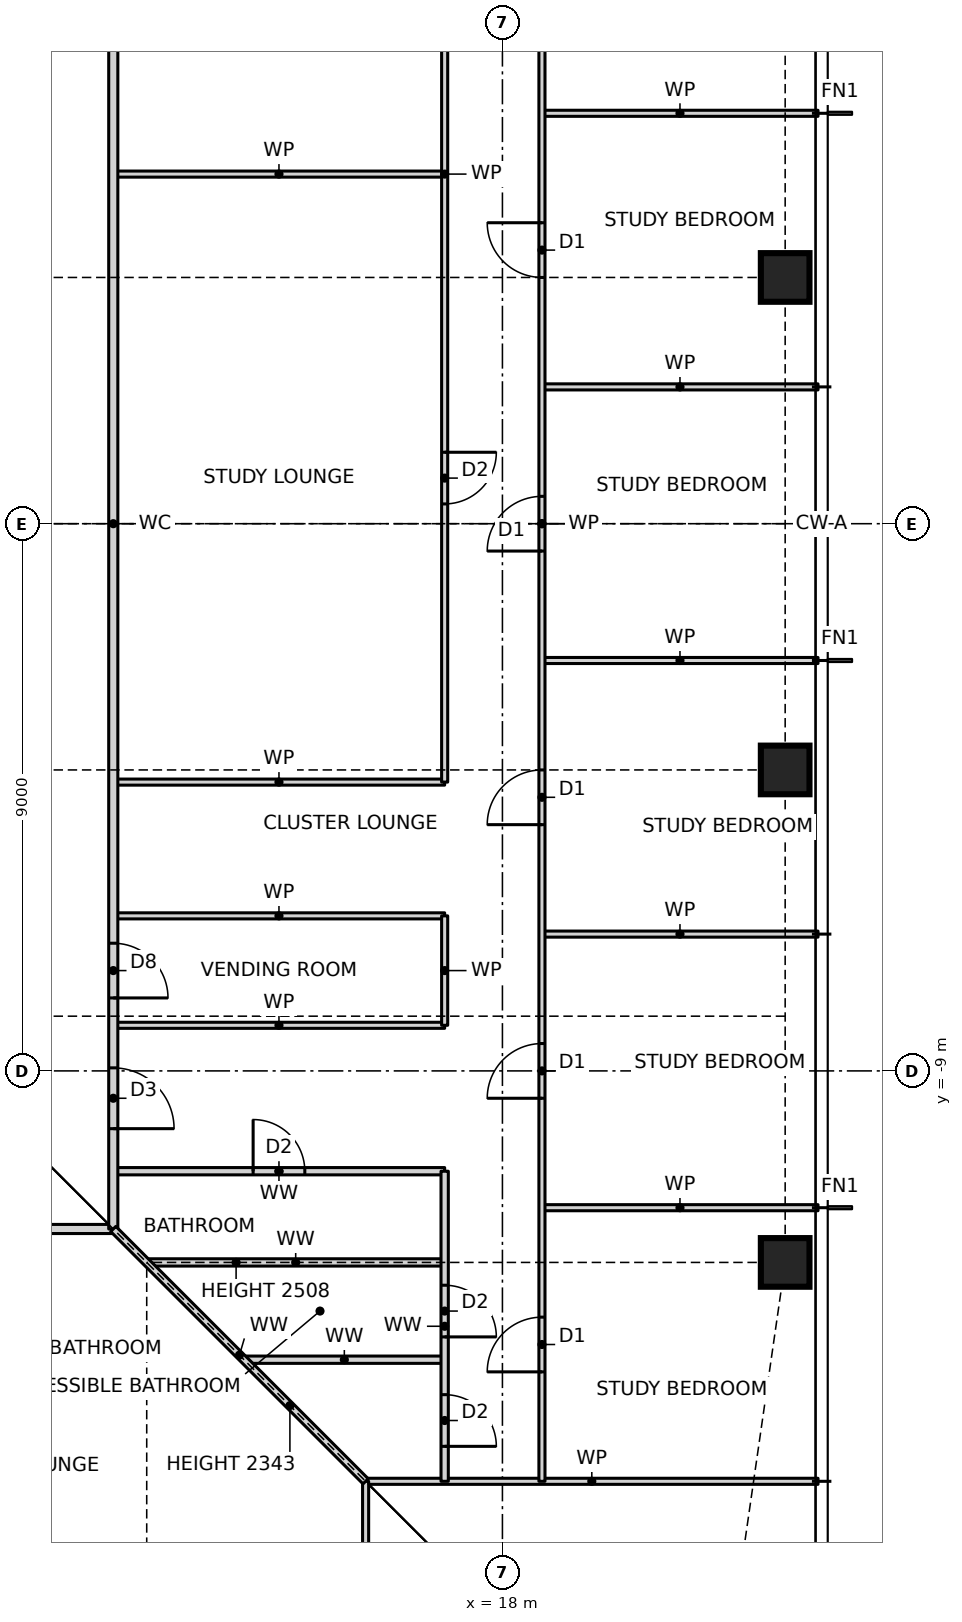
"""IFC4 building model, lengths in metres.
Left out: names, types, materials, properties, quantities, classifications, styles, units other than length and angle.
Written with IfcOpenShell. Run it as: python <this file> out.ifc"""

import sys

from ifc_helpers import new_model, si_unit, direction, frame, frame_2d, origin, origin_2d, place, context, subcontext, project, spatial, rectangle, hollow_rectangle, extrude, element, fill, save


model = new_model("IFC4")
c1 = context("Model", 3, precision=1e-05, world=origin(), true_north=direction((0.0, 1.0)))
c2 = subcontext(c1, "Body", "Model", "MODEL_VIEW")
j1 = project(units=[si_unit("LENGTHUNIT", "METRE"), si_unit("PLANEANGLEUNIT", "RADIAN")], contexts=[c1])
p1 = place(None, origin())
s1 = spatial("IfcSite", under=j1, at=p1, CompositionType="ELEMENT")
p2 = place(p1, origin())
s2 = spatial("IfcBuilding", under=s1, at=p2, CompositionType="ELEMENT")
p3 = place(p2, frame((0.0, 0.0, 50.0)))
s3 = spatial("IfcBuildingStorey", under=s2, at=p3, CompositionType="ELEMENT", Elevation=50.0)
for number, where, z_axis, x_axis in (
    (1, (22.65, -12.15, 0.0), (0.0, 0.0, 1.0), (1.0, 0.0, 0.0)),
    (2, (22.65, -4.05, 0.0), (0.0, 0.0, 1.0), (1.0, 0.0, 0.0)),
    (3, (22.65, 4.05, 0.0), (0.0, 0.0, 1.0), (1.0, 0.0, 0.0)),
):
    element("IfcColumn", number, at=place(p3, frame(where, z_axis=z_axis, x_axis=x_axis)), inside=s3, PredefinedType="COLUMN", context=c2, shape_type="SweptSolid", body=[
        extrude(hollow_rectangle(XDim=0.8, YDim=0.8, WallThickness=0.09, at=origin_2d()), origin(), (0.0, 0.0, 1.0), 3.5),
    ])
p4 = place(p3, frame((15.75, -15.75, 0.0), z_axis=(0.0, 0.0, 1.0), x_axis=(1.0, 0.0, 0.0)))
e4 = element("IfcWall", 4, at=p4, inside=s3, PredefinedType="PARTITIONING", context=c2, shape_type="SweptSolid", body=[
    extrude(rectangle(XDim=7.44, YDim=0.1, at=frame_2d((3.72, 0.0))), origin(), (0.0, 0.0, 1.0), 3.27),
])
p5 = place(p3, frame((13.75, -13.75, 0.0), z_axis=(0.0, 0.0, 1.0), x_axis=(1.0, 0.0, 0.0)))
e5 = element("IfcWall", 5, at=p5, inside=s3, PredefinedType="PARTITIONING", context=c2, shape_type="SweptSolid", body=[
    extrude(rectangle(XDim=3.3, YDim=0.12, at=frame_2d((1.65, 0.0))), origin(), (0.0, 0.0, 1.0), 3.27),
])
p6 = place(p3, frame((12.15, -12.15, 0.0), z_axis=(0.0, 0.0, 1.0), x_axis=(1.0, 0.0, 0.0)))
e6 = element("IfcWall", 6, at=p6, inside=s3, PredefinedType="PARTITIONING", context=c2, shape_type="SweptSolid", body=[
    extrude(rectangle(XDim=4.9, YDim=0.12, at=frame_2d((2.45, 0.0))), origin(), (0.0, 0.0, 1.0), 2.508),
])
p7 = place(p3, frame((-12.6, -11.6, 0.0), z_axis=(0.0, 0.0, 1.0), x_axis=(1.0, 0.0, 0.0)))
e7 = element("IfcWall", 7, at=p7, inside=s3, PredefinedType="PARTITIONING", context=c2, shape_type="SweptSolid", body=[
    extrude(rectangle(XDim=24.2, YDim=0.15, at=frame_2d((12.1, 0.0))), origin(), (0.0, 0.0, 1.0), 3.27),
])
p8 = place(p7, frame((1.74, 0.0, 0.0)))
e8 = element("IfcOpeningElement", 8, at=p8, cuts=e7, PredefinedType="OPENING", context=c2, shape_type="SweptSolid", body=[
    extrude(rectangle(XDim=1.0, YDim=2.1, at=frame_2d((0.5, 1.05))), frame((0.0, 0.085, 0.0), z_axis=(0.0, -1.0, 0.0), x_axis=(1.0, 0.0, 0.0)), (0.0, 0.0, 1.0), 0.17),
])
p9 = place(p7, frame((22.025, 0.0, 0.0)))
e9 = element("IfcOpeningElement", 9, at=p9, cuts=e7, PredefinedType="OPENING", context=c2, shape_type="SweptSolid", body=[
    extrude(rectangle(XDim=1.0, YDim=2.1, at=frame_2d((0.5, 1.05))), frame((0.0, 0.085, 0.0), z_axis=(0.0, -1.0, 0.0), x_axis=(1.0, 0.0, 0.0)), (0.0, 0.0, 1.0), 0.17),
])
p10 = place(p3, frame((18.65, -11.25, 0.0), z_axis=(0.0, 0.0, 1.0), x_axis=(1.0, 0.0, 0.0)))
e10 = element("IfcWall", 10, at=p10, inside=s3, PredefinedType="PARTITIONING", context=c2, shape_type="SweptSolid", body=[
    extrude(rectangle(XDim=4.54, YDim=0.1, at=frame_2d((2.27, 0.0))), origin(), (0.0, 0.0, 1.0), 3.27),
])
p11 = place(p3, frame((11.6, -10.65, 0.0), z_axis=(0.0, 0.0, 1.0), x_axis=(1.0, 0.0, 0.0)))
e11 = element("IfcWall", 11, at=p11, inside=s3, PredefinedType="PARTITIONING", context=c2, shape_type="SweptSolid", body=[
    extrude(rectangle(XDim=5.45, YDim=0.12, at=frame_2d((2.725, 0.0))), origin(), (0.0, 0.0, 1.0), 3.27),
])
p12 = place(p11, frame((2.3, 0.0, 0.0)))
e12 = element("IfcOpeningElement", 12, at=p12, cuts=e11, PredefinedType="OPENING", context=c2, shape_type="SweptSolid", body=[
    extrude(rectangle(XDim=0.85, YDim=2.1, at=frame_2d((0.425, 1.05))), frame((0.0, 0.07, 0.0), z_axis=(0.0, -1.0, 0.0), x_axis=(1.0, 0.0, 0.0)), (0.0, 0.0, 1.0), 0.14),
])
p13 = place(p3, frame((11.6, -8.25, 0.0), z_axis=(0.0, 0.0, 1.0), x_axis=(1.0, 0.0, 0.0)))
e13 = element("IfcWall", 13, at=p13, inside=s3, PredefinedType="PARTITIONING", context=c2, shape_type="SweptSolid", body=[
    extrude(rectangle(XDim=5.45, YDim=0.1, at=frame_2d((2.725, 0.0))), origin(), (0.0, 0.0, 1.0), 3.27),
])
p14 = place(p3, frame((18.65, -6.75, 0.0), z_axis=(0.0, 0.0, 1.0), x_axis=(1.0, 0.0, 0.0)))
e14 = element("IfcWall", 14, at=p14, inside=s3, PredefinedType="PARTITIONING", context=c2, shape_type="SweptSolid", body=[
    extrude(rectangle(XDim=4.54, YDim=0.1, at=frame_2d((2.27, 0.0))), origin(), (0.0, 0.0, 1.0), 3.27),
])
for number, where, z_axis, x_axis in (
    (15, (11.6, -6.45, 0.0), (0.0, 0.0, 1.0), (1.0, 0.0, 0.0)),
    (16, (11.6, -4.25, 0.0), (0.0, 0.0, 1.0), (1.0, 0.0, 0.0)),
):
    element("IfcWall", number, at=place(p3, frame(where, z_axis=z_axis, x_axis=x_axis)), inside=s3, PredefinedType="PARTITIONING", context=c2, shape_type="SweptSolid", body=[
        extrude(rectangle(XDim=5.45, YDim=0.1, at=frame_2d((2.725, 0.0))), origin(), (0.0, 0.0, 1.0), 3.27),
    ])
for number, where, z_axis, x_axis in (
    (17, (18.65, -2.25, 0.0), (0.0, 0.0, 1.0), (1.0, 0.0, 0.0)),
    (18, (18.65, 2.25, 0.0), (0.0, 0.0, 1.0), (1.0, 0.0, 0.0)),
):
    element("IfcWall", number, at=place(p3, frame(where, z_axis=z_axis, x_axis=x_axis)), inside=s3, PredefinedType="PARTITIONING", context=c2, shape_type="SweptSolid", body=[
        extrude(rectangle(XDim=4.54, YDim=0.1, at=frame_2d((2.27, 0.0))), origin(), (0.0, 0.0, 1.0), 3.27),
    ])
p15 = place(p3, frame((11.6, 5.75, 0.0), z_axis=(0.0, 0.0, 1.0), x_axis=(1.0, 0.0, 0.0)))
e19 = element("IfcWall", 19, at=p15, inside=s3, PredefinedType="PARTITIONING", context=c2, shape_type="SweptSolid", body=[
    extrude(rectangle(XDim=5.45, YDim=0.1, at=frame_2d((2.725, 0.0))), origin(), (0.0, 0.0, 1.0), 3.27),
])
p16 = place(p3, frame((18.65, 6.75, 0.0), z_axis=(0.0, 0.0, 1.0), x_axis=(1.0, 0.0, 0.0)))
e20 = element("IfcWall", 20, at=p16, inside=s3, PredefinedType="PARTITIONING", context=c2, shape_type="SweptSolid", body=[
    extrude(rectangle(XDim=4.54, YDim=0.1, at=frame_2d((2.27, 0.0))), origin(), (0.0, 0.0, 1.0), 3.27),
])
p17 = place(p3, frame((18.65, -15.75, 0.0), z_axis=(0.0, 0.0, 1.0), x_axis=(0.0, 1.0, 0.0)))
e21 = element("IfcWall", 21, at=p17, inside=s3, PredefinedType="PARTITIONING", context=c2, shape_type="SweptSolid", body=[
    extrude(rectangle(XDim=31.5, YDim=0.1, at=frame_2d((15.75, 0.0))), origin(), (0.0, 0.0, 1.0), 3.27),
])
p18 = place(p17, frame((1.8, 0.0, 0.0)))
e22 = element("IfcOpeningElement", 22, at=p18, cuts=e21, PredefinedType="OPENING", context=c2, shape_type="SweptSolid", body=[
    extrude(rectangle(XDim=0.9, YDim=2.1, at=frame_2d((0.45, 1.05))), frame((0.0, 0.06, 0.0), z_axis=(0.0, -1.0, 0.0), x_axis=(1.0, 0.0, 0.0)), (0.0, 0.0, 1.0), 0.12),
])
p19 = place(p17, frame((6.3, 0.0, 0.0)))
e23 = element("IfcOpeningElement", 23, at=p19, cuts=e21, PredefinedType="OPENING", context=c2, shape_type="SweptSolid", body=[
    extrude(rectangle(XDim=0.9, YDim=2.1, at=frame_2d((0.45, 1.05))), frame((0.0, 0.06, 0.0), z_axis=(0.0, -1.0, 0.0), x_axis=(1.0, 0.0, 0.0)), (0.0, 0.0, 1.0), 0.12),
])
p20 = place(p17, frame((10.8, 0.0, 0.0)))
e24 = element("IfcOpeningElement", 24, at=p20, cuts=e21, PredefinedType="OPENING", context=c2, shape_type="SweptSolid", body=[
    extrude(rectangle(XDim=0.9, YDim=2.1, at=frame_2d((0.45, 1.05))), frame((0.0, 0.06, 0.0), z_axis=(0.0, -1.0, 0.0), x_axis=(1.0, 0.0, 0.0)), (0.0, 0.0, 1.0), 0.12),
])
p21 = place(p17, frame((15.3, 0.0, 0.0)))
e25 = element("IfcOpeningElement", 25, at=p21, cuts=e21, PredefinedType="OPENING", context=c2, shape_type="SweptSolid", body=[
    extrude(rectangle(XDim=0.9, YDim=2.1, at=frame_2d((0.45, 1.05))), frame((0.0, 0.06, 0.0), z_axis=(0.0, -1.0, 0.0), x_axis=(1.0, 0.0, 0.0)), (0.0, 0.0, 1.0), 0.12),
])
p22 = place(p17, frame((19.8, 0.0, 0.0)))
e26 = element("IfcOpeningElement", 26, at=p22, cuts=e21, PredefinedType="OPENING", context=c2, shape_type="SweptSolid", body=[
    extrude(rectangle(XDim=0.9, YDim=2.1, at=frame_2d((0.45, 1.05))), frame((0.0, 0.06, 0.0), z_axis=(0.0, -1.0, 0.0), x_axis=(1.0, 0.0, 0.0)), (0.0, 0.0, 1.0), 0.12),
])
p23 = place(p17, frame((24.3, 0.0, 0.0)))
e27 = element("IfcOpeningElement", 27, at=p23, cuts=e21, PredefinedType="OPENING", context=c2, shape_type="SweptSolid", body=[
    extrude(rectangle(XDim=0.9, YDim=2.1, at=frame_2d((0.45, 1.05))), frame((0.0, 0.06, 0.0), z_axis=(0.0, -1.0, 0.0), x_axis=(1.0, 0.0, 0.0)), (0.0, 0.0, 1.0), 0.12),
])
p24 = place(p17, frame((28.8, 0.0, 0.0)))
e28 = element("IfcOpeningElement", 28, at=p24, cuts=e21, PredefinedType="OPENING", context=c2, shape_type="SweptSolid", body=[
    extrude(rectangle(XDim=0.9, YDim=2.1, at=frame_2d((0.45, 1.05))), frame((0.0, 0.06, 0.0), z_axis=(0.0, -1.0, 0.0), x_axis=(1.0, 0.0, 0.0)), (0.0, 0.0, 1.0), 0.12),
])
p25 = place(p3, frame((17.05, -15.75, 0.0), z_axis=(0.0, 0.0, 1.0), x_axis=(0.0, 1.0, 0.0)))
e29 = element("IfcWall", 29, at=p25, inside=s3, PredefinedType="PARTITIONING", context=c2, shape_type="SweptSolid", body=[
    extrude(rectangle(XDim=5.1, YDim=0.12, at=frame_2d((2.55, 0.0))), origin(), (0.0, 0.0, 1.0), 3.27),
])
p26 = place(p25, frame((0.575, 0.0, 0.0)))
e30 = element("IfcOpeningElement", 30, at=p26, cuts=e29, PredefinedType="OPENING", context=c2, shape_type="SweptSolid", body=[
    extrude(rectangle(XDim=0.85, YDim=2.1, at=frame_2d((0.425, 1.05))), frame((0.0, 0.07, 0.0), z_axis=(0.0, -1.0, 0.0), x_axis=(1.0, 0.0, 0.0)), (0.0, 0.0, 1.0), 0.14),
])
p27 = place(p25, frame((2.375, 0.0, 0.0)))
e31 = element("IfcOpeningElement", 31, at=p27, cuts=e29, PredefinedType="OPENING", context=c2, shape_type="SweptSolid", body=[
    extrude(rectangle(XDim=0.85, YDim=2.1, at=frame_2d((0.425, 1.05))), frame((0.0, 0.07, 0.0), z_axis=(0.0, -1.0, 0.0), x_axis=(1.0, 0.0, 0.0)), (0.0, 0.0, 1.0), 0.14),
])
p28 = place(p3, frame((17.05, -8.25, 0.0), z_axis=(0.0, 0.0, 1.0), x_axis=(0.0, 1.0, 0.0)))
e32 = element("IfcWall", 32, at=p28, inside=s3, PredefinedType="PARTITIONING", context=c2, shape_type="SweptSolid", body=[
    extrude(rectangle(XDim=1.8, YDim=0.1, at=frame_2d((0.9, 0.0))), origin(), (0.0, 0.0, 1.0), 3.27),
])
p29 = place(p3, frame((17.05, -4.25, 0.0), z_axis=(0.0, 0.0, 1.0), x_axis=(0.0, 1.0, 0.0)))
e33 = element("IfcWall", 33, at=p29, inside=s3, PredefinedType="PARTITIONING", context=c2, shape_type="SweptSolid", body=[
    extrude(rectangle(XDim=20.0, YDim=0.1, at=frame_2d((10.0, 0.0))), origin(), (0.0, 0.0, 1.0), 3.27),
])
p30 = place(p29, frame((4.575, 0.0, 0.0)))
e34 = element("IfcOpeningElement", 34, at=p30, cuts=e33, PredefinedType="OPENING", context=c2, shape_type="SweptSolid", body=[
    extrude(rectangle(XDim=0.85, YDim=2.1, at=frame_2d((0.425, 1.05))), frame((0.0, 0.06, 0.0), z_axis=(0.0, -1.0, 0.0), x_axis=(1.0, 0.0, 0.0)), (0.0, 0.0, 1.0), 0.12),
])
p31 = place(p29, frame((14.575, 0.0, 0.0)))
e35 = element("IfcOpeningElement", 35, at=p31, cuts=e33, PredefinedType="OPENING", context=c2, shape_type="SweptSolid", body=[
    extrude(rectangle(XDim=0.85, YDim=2.1, at=frame_2d((0.425, 1.05))), frame((0.0, 0.06, 0.0), z_axis=(0.0, -1.0, 0.0), x_axis=(1.0, 0.0, 0.0)), (0.0, 0.0, 1.0), 0.12),
])
p32 = place(p3, frame((15.75, -23.19, 0.0), z_axis=(0.0, 0.0, 1.0), x_axis=(0.0, 1.0, 0.0)))
e36 = element("IfcWall", 36, at=p32, inside=s3, PredefinedType="PARTITIONING", context=c2, shape_type="SweptSolid", body=[
    extrude(rectangle(XDim=7.44, YDim=0.1, at=frame_2d((3.72, 0.0))), origin(), (0.0, 0.0, 1.0), 3.27),
])
p33 = place(p32, frame((4.915, 0.0, 0.0)))
e37 = element("IfcOpeningElement", 37, at=p33, cuts=e36, PredefinedType="OPENING", context=c2, shape_type="SweptSolid", body=[
    extrude(rectangle(XDim=0.85, YDim=2.1, at=frame_2d((0.425, 1.05))), frame((0.0, 0.06, 0.0), z_axis=(0.0, -1.0, 0.0), x_axis=(1.0, 0.0, 0.0)), (0.0, 0.0, 1.0), 0.12),
])
p34 = place(p3, frame((11.6, -11.6, 0.0), z_axis=(0.0, 0.0, 1.0), x_axis=(0.0, 1.0, 0.0)))
e38 = element("IfcWall", 38, at=p34, inside=s3, PredefinedType="PARTITIONING", context=c2, shape_type="SweptSolid", body=[
    extrude(rectangle(XDim=23.2, YDim=0.15, at=frame_2d((11.6, 0.0))), origin(), (0.0, 0.0, 1.0), 3.27),
])
p35 = place(p34, frame((1.65, 0.0, 0.0)))
e39 = element("IfcOpeningElement", 39, at=p35, cuts=e38, PredefinedType="OPENING", context=c2, shape_type="SweptSolid", body=[
    extrude(rectangle(XDim=1.0, YDim=2.1, at=frame_2d((0.5, 1.05))), frame((0.0, 0.085, 0.0), z_axis=(0.0, -1.0, 0.0), x_axis=(1.0, 0.0, 0.0)), (0.0, 0.0, 1.0), 0.17),
])
p36 = place(p34, frame((3.8, 0.0, 0.0)))
e40 = element("IfcOpeningElement", 40, at=p36, cuts=e38, PredefinedType="OPENING", context=c2, shape_type="SweptSolid", body=[
    extrude(rectangle(XDim=0.9, YDim=2.1, at=frame_2d((0.45, 1.05))), frame((0.0, 0.085, 0.0), z_axis=(0.0, -1.0, 0.0), x_axis=(1.0, 0.0, 0.0)), (0.0, 0.0, 1.0), 0.17),
])
p37 = place(p3, frame((15.75, -15.75, 0.0), z_axis=(0.0, 0.0, 1.0), x_axis=(-0.707106781187, 0.707106781187, 0.0)))
e41 = element("IfcWall", 41, at=p37, inside=s3, PredefinedType="PARTITIONING", context=c2, shape_type="SweptSolid", body=[
    extrude(rectangle(XDim=5.869, YDim=0.12, at=frame_2d((2.935, 0.0))), origin(), (0.0, 0.0, 1.0), 2.343),
])
p38 = place(p18, origin())
e42 = element("IfcDoor", 42, at=p38, inside=s3, OperationType="SINGLE_SWING_LEFT", PredefinedType="DOOR", context=c2, shape_type="SweptSolid", body=[
    extrude(rectangle(XDim=0.9, YDim=2.1, at=frame_2d((0.45, 1.05))), frame((0.0, 0.025, 0.0), z_axis=(0.0, -1.0, 0.0), x_axis=(1.0, 0.0, 0.0)), (0.0, 0.0, 1.0), 0.05),
])
fill(e22, e42)
p39 = place(p19, origin())
e43 = element("IfcDoor", 43, at=p39, inside=s3, OperationType="SINGLE_SWING_LEFT", PredefinedType="DOOR", context=c2, shape_type="SweptSolid", body=[
    extrude(rectangle(XDim=0.9, YDim=2.1, at=frame_2d((0.45, 1.05))), frame((0.0, 0.025, 0.0), z_axis=(0.0, -1.0, 0.0), x_axis=(1.0, 0.0, 0.0)), (0.0, 0.0, 1.0), 0.05),
])
fill(e23, e43)
p40 = place(p20, origin())
e44 = element("IfcDoor", 44, at=p40, inside=s3, OperationType="SINGLE_SWING_LEFT", PredefinedType="DOOR", context=c2, shape_type="SweptSolid", body=[
    extrude(rectangle(XDim=0.9, YDim=2.1, at=frame_2d((0.45, 1.05))), frame((0.0, 0.025, 0.0), z_axis=(0.0, -1.0, 0.0), x_axis=(1.0, 0.0, 0.0)), (0.0, 0.0, 1.0), 0.05),
])
fill(e24, e44)
p41 = place(p21, origin())
e45 = element("IfcDoor", 45, at=p41, inside=s3, OperationType="SINGLE_SWING_LEFT", PredefinedType="DOOR", context=c2, shape_type="SweptSolid", body=[
    extrude(rectangle(XDim=0.9, YDim=2.1, at=frame_2d((0.45, 1.05))), frame((0.0, 0.025, 0.0), z_axis=(0.0, -1.0, 0.0), x_axis=(1.0, 0.0, 0.0)), (0.0, 0.0, 1.0), 0.05),
])
fill(e25, e45)
p42 = place(p22, origin())
e46 = element("IfcDoor", 46, at=p42, inside=s3, OperationType="SINGLE_SWING_RIGHT", PredefinedType="DOOR", context=c2, shape_type="SweptSolid", body=[
    extrude(rectangle(XDim=0.9, YDim=2.1, at=frame_2d((0.45, 1.05))), frame((0.0, 0.025, 0.0), z_axis=(0.0, -1.0, 0.0), x_axis=(1.0, 0.0, 0.0)), (0.0, 0.0, 1.0), 0.05),
])
fill(e26, e46)
p43 = place(p35, frame((1.0, 0.0, 0.0), z_axis=(0.0, 0.0, 1.0), x_axis=(-1.0, 0.0, 0.0)))
e47 = element("IfcDoor", 47, at=p43, inside=s3, OperationType="SINGLE_SWING_RIGHT", PredefinedType="DOOR", context=c2, shape_type="SweptSolid", body=[
    extrude(rectangle(XDim=1.0, YDim=2.1, at=frame_2d((0.5, 1.05))), frame((0.0, 0.025, 0.0), z_axis=(0.0, -1.0, 0.0), x_axis=(1.0, 0.0, 0.0)), (0.0, 0.0, 1.0), 0.05),
])
fill(e39, e47)
p44 = place(p26, frame((0.85, 0.0, 0.0), z_axis=(0.0, 0.0, 1.0), x_axis=(-1.0, 0.0, 0.0)))
e48 = element("IfcDoor", 48, at=p44, inside=s3, OperationType="SINGLE_SWING_RIGHT", PredefinedType="DOOR", context=c2, shape_type="SweptSolid", body=[
    extrude(rectangle(XDim=0.85, YDim=2.1, at=frame_2d((0.425, 1.05))), frame((0.0, 0.025, 0.0), z_axis=(0.0, -1.0, 0.0), x_axis=(1.0, 0.0, 0.0)), (0.0, 0.0, 1.0), 0.05),
])
fill(e30, e48)
p45 = place(p27, frame((0.85, 0.0, 0.0), z_axis=(0.0, 0.0, 1.0), x_axis=(-1.0, 0.0, 0.0)))
e49 = element("IfcDoor", 49, at=p45, inside=s3, OperationType="SINGLE_SWING_RIGHT", PredefinedType="DOOR", context=c2, shape_type="SweptSolid", body=[
    extrude(rectangle(XDim=0.85, YDim=2.1, at=frame_2d((0.425, 1.05))), frame((0.0, 0.025, 0.0), z_axis=(0.0, -1.0, 0.0), x_axis=(1.0, 0.0, 0.0)), (0.0, 0.0, 1.0), 0.05),
])
fill(e31, e49)
p46 = place(p12, origin())
e50 = element("IfcDoor", 50, at=p46, inside=s3, OperationType="SINGLE_SWING_LEFT", PredefinedType="DOOR", context=c2, shape_type="SweptSolid", body=[
    extrude(rectangle(XDim=0.85, YDim=2.1, at=frame_2d((0.425, 1.05))), frame((0.0, 0.025, 0.0), z_axis=(0.0, -1.0, 0.0), x_axis=(1.0, 0.0, 0.0)), (0.0, 0.0, 1.0), 0.05),
])
fill(e12, e50)
p47 = place(p36, frame((0.9, 0.0, 0.0), z_axis=(0.0, 0.0, 1.0), x_axis=(-1.0, 0.0, 0.0)))
e51 = element("IfcDoor", 51, at=p47, inside=s3, OperationType="SINGLE_SWING_RIGHT", PredefinedType="DOOR", context=c2, shape_type="SweptSolid", body=[
    extrude(rectangle(XDim=0.9, YDim=2.1, at=frame_2d((0.45, 1.05))), frame((0.0, 0.025, 0.0), z_axis=(0.0, -1.0, 0.0), x_axis=(1.0, 0.0, 0.0)), (0.0, 0.0, 1.0), 0.05),
])
fill(e40, e51)
p48 = place(p30, frame((0.85, 0.0, 0.0), z_axis=(0.0, 0.0, 1.0), x_axis=(-1.0, 0.0, 0.0)))
e52 = element("IfcDoor", 52, at=p48, inside=s3, OperationType="SINGLE_SWING_LEFT", PredefinedType="DOOR", context=c2, shape_type="SweptSolid", body=[
    extrude(rectangle(XDim=0.85, YDim=2.1, at=frame_2d((0.425, 1.05))), frame((0.0, 0.025, 0.0), z_axis=(0.0, -1.0, 0.0), x_axis=(1.0, 0.0, 0.0)), (0.0, 0.0, 1.0), 0.05),
])
fill(e34, e52)
save(model, sys.argv[1])
